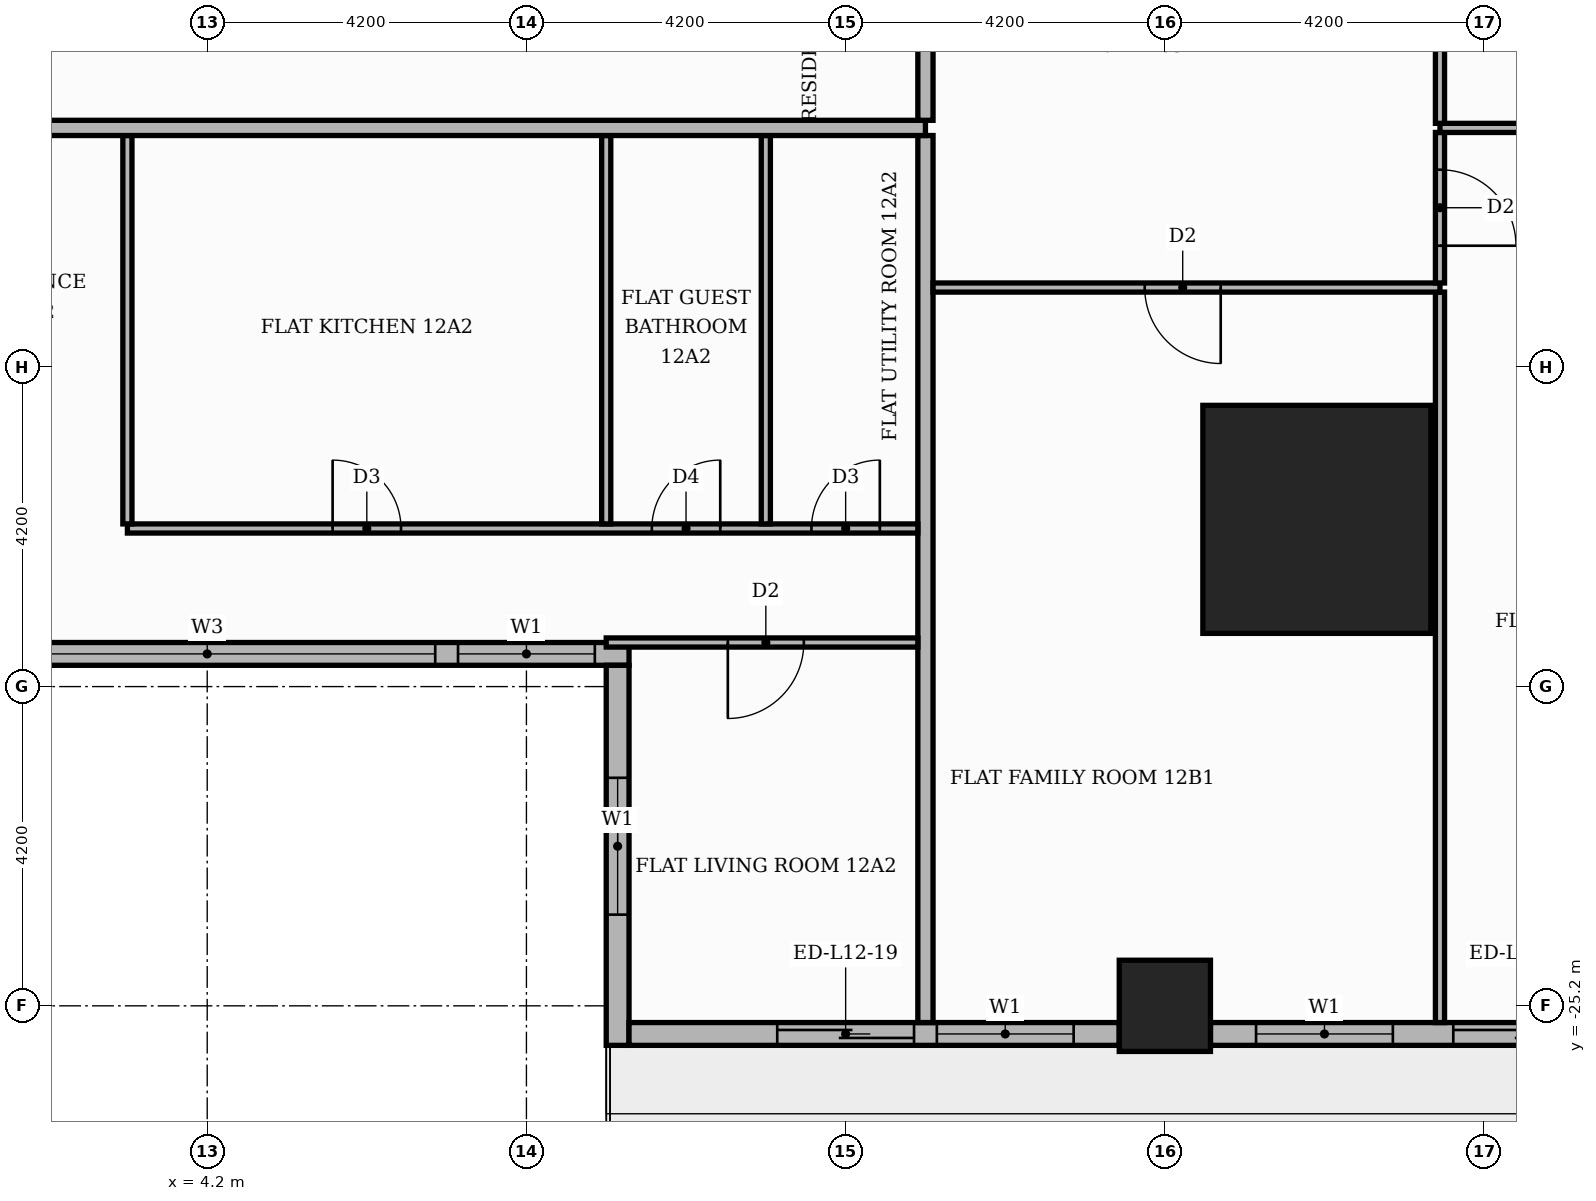
"""IFC4 building model, lengths in metres.
Left out: names, types, materials, properties, quantities, classifications, styles, units other than length and angle.
Written with IfcOpenShell. Run it as: python <this file> out.ifc"""

import sys

from ifc_helpers import new_model, si_unit, direction, frame, frame_2d, origin, origin_2d, place, context, subcontext, project, spatial, rectangle, extrude, element, fill, save


model = new_model("IFC4")
c1 = context("Model", 3, precision=1e-05, world=origin(), true_north=direction((0.0, 1.0)))
c2 = subcontext(c1, "Body", "Model", "MODEL_VIEW")
j1 = project(units=[si_unit("LENGTHUNIT", "METRE"), si_unit("PLANEANGLEUNIT", "RADIAN")], contexts=[c1])
p1 = place(None, origin())
s1 = spatial("IfcSite", under=j1, at=p1, CompositionType="ELEMENT")
p2 = place(p1, origin())
s2 = spatial("IfcBuilding", under=s1, at=p2, CompositionType="ELEMENT")
p3 = place(p2, frame((0.0, 0.0, 54.3)))
s3 = spatial("IfcBuildingStorey", under=s2, at=p3, CompositionType="ELEMENT", Elevation=54.3)
p4 = place(p3, frame((18.8, -18.8, 0.0), z_axis=(0.0, 0.0, 1.0), x_axis=(1.0, 0.0, 0.0)))
e1 = element("IfcColumn", 1, at=p4, inside=s3, PredefinedType="COLUMN", context=c2, shape_type="SweptSolid", body=[
    extrude(rectangle(XDim=3.0, YDim=3.0, at=origin_2d()), origin(), (0.0, 0.0, 1.0), 3.9),
])
p5 = place(p3, frame((16.8, -25.2, 0.0), z_axis=(0.0, 0.0, 1.0), x_axis=(1.0, 0.0, 0.0)))
e2 = element("IfcColumn", 2, at=p5, inside=s3, PredefinedType="COLUMN", context=c2, shape_type="SweptSolid", body=[
    extrude(rectangle(XDim=1.2, YDim=1.2, at=origin_2d()), origin(), (0.0, 0.0, 1.0), 3.9),
])
p6 = place(p3, frame((-9.45, -20.57, 0.0), z_axis=(0.0, 0.0, 1.0), x_axis=(1.0, 0.0, 0.0)))
e3 = element("IfcWall", 3, at=p6, inside=s3, PredefinedType="STANDARD", context=c2, shape_type="SweptSolid", body=[
    extrude(rectangle(XDim=19.2, YDim=0.3, at=frame_2d((9.6, 0.0))), origin(), (0.0, 0.0, 1.0), 3.48),
])
p7 = place(p6, frame((0.15, 0.0, 0.9)))
e4 = element("IfcOpeningElement", 4, at=p7, cuts=e3, PredefinedType="OPENING", context=c2, shape_type="SweptSolid", body=[
    extrude(rectangle(XDim=3.9, YDim=2.1, at=frame_2d((1.95, 1.05))), frame((0.0, 0.16, 0.0), z_axis=(0.0, -1.0, 0.0), x_axis=(1.0, 0.0, 0.0)), (0.0, 0.0, 1.0), 0.32),
])
p8 = place(p6, frame((4.35, 0.0, 0.9)))
e5 = element("IfcOpeningElement", 5, at=p8, cuts=e3, PredefinedType="OPENING", context=c2, shape_type="SweptSolid", body=[
    extrude(rectangle(XDim=6.0, YDim=2.1, at=frame_2d((3.0, 1.05))), frame((0.0, 0.16, 0.0), z_axis=(0.0, -1.0, 0.0), x_axis=(1.0, 0.0, 0.0)), (0.0, 0.0, 1.0), 0.32),
])
p9 = place(p6, frame((10.65, 0.0, 0.9)))
e6 = element("IfcOpeningElement", 6, at=p9, cuts=e3, PredefinedType="OPENING", context=c2, shape_type="SweptSolid", body=[
    extrude(rectangle(XDim=6.0, YDim=2.1, at=frame_2d((3.0, 1.05))), frame((0.0, 0.16, 0.0), z_axis=(0.0, -1.0, 0.0), x_axis=(1.0, 0.0, 0.0)), (0.0, 0.0, 1.0), 0.32),
])
p10 = place(p6, frame((16.95, 0.0, 0.9)))
e7 = element("IfcOpeningElement", 7, at=p10, cuts=e3, PredefinedType="OPENING", context=c2, shape_type="SweptSolid", body=[
    extrude(rectangle(XDim=1.8, YDim=2.1, at=frame_2d((0.9, 1.05))), frame((0.0, 0.16, 0.0), z_axis=(0.0, -1.0, 0.0), x_axis=(1.0, 0.0, 0.0)), (0.0, 0.0, 1.0), 0.32),
])
p11 = place(p3, frame((9.6, -20.72, 0.0), z_axis=(0.0, 0.0, 1.0), x_axis=(0.0, -1.0, 0.0)))
e8 = element("IfcWall", 8, at=p11, inside=s3, PredefinedType="STANDARD", context=c2, shape_type="SweptSolid", body=[
    extrude(rectangle(XDim=5.0, YDim=0.3, at=frame_2d((2.5, 0.0))), origin(), (0.0, 0.0, 1.0), 3.48),
])
p12 = place(p11, frame((1.48, 0.0, 0.9)))
e9 = element("IfcOpeningElement", 9, at=p12, cuts=e8, PredefinedType="OPENING", context=c2, shape_type="SweptSolid", body=[
    extrude(rectangle(XDim=1.8, YDim=2.1, at=frame_2d((0.9, 1.05))), frame((0.0, 0.16, 0.0), z_axis=(0.0, -1.0, 0.0), x_axis=(1.0, 0.0, 0.0)), (0.0, 0.0, 1.0), 0.32),
])
p13 = place(p3, frame((9.75, -25.57, 0.0), z_axis=(0.0, 0.0, 1.0), x_axis=(1.0, 0.0, 0.0)))
e10 = element("IfcWall", 10, at=p13, inside=s3, PredefinedType="STANDARD", context=c2, shape_type="SweptSolid", body=[
    extrude(rectangle(XDim=6.45, YDim=0.3, at=frame_2d((3.225, 0.0))), origin(), (0.0, 0.0, 1.0), 3.48),
])
p14 = place(p13, frame((1.95, 0.0, 0.0)))
e11 = element("IfcOpeningElement", 11, at=p14, cuts=e10, PredefinedType="OPENING", context=c2, shape_type="SweptSolid", body=[
    extrude(rectangle(XDim=1.8, YDim=2.4, at=frame_2d((0.9, 1.2))), frame((0.0, 0.16, 0.0), z_axis=(0.0, -1.0, 0.0), x_axis=(1.0, 0.0, 0.0)), (0.0, 0.0, 1.0), 0.32),
])
p15 = place(p13, frame((4.05, 0.0, 0.9)))
e12 = element("IfcOpeningElement", 12, at=p15, cuts=e10, PredefinedType="OPENING", context=c2, shape_type="SweptSolid", body=[
    extrude(rectangle(XDim=1.8, YDim=2.1, at=frame_2d((0.9, 1.05))), frame((0.0, 0.16, 0.0), z_axis=(0.0, -1.0, 0.0), x_axis=(1.0, 0.0, 0.0)), (0.0, 0.0, 1.0), 0.32),
])
p16 = place(p3, frame((17.4, -25.57, 0.0), z_axis=(0.0, 0.0, 1.0), x_axis=(1.0, 0.0, 0.0)))
e13 = element("IfcWall", 13, at=p16, inside=s3, PredefinedType="STANDARD", context=c2, shape_type="SweptSolid", body=[
    extrude(rectangle(XDim=5.32, YDim=0.3, at=frame_2d((2.66, 0.0))), origin(), (0.0, 0.0, 1.0), 3.48),
])
p17 = place(p16, frame((0.6, 0.0, 0.9)))
e14 = element("IfcOpeningElement", 14, at=p17, cuts=e13, PredefinedType="OPENING", context=c2, shape_type="SweptSolid", body=[
    extrude(rectangle(XDim=1.8, YDim=2.1, at=frame_2d((0.9, 1.05))), frame((0.0, 0.16, 0.0), z_axis=(0.0, -1.0, 0.0), x_axis=(1.0, 0.0, 0.0)), (0.0, 0.0, 1.0), 0.32),
])
p18 = place(p16, frame((3.195, 0.0, 0.0)))
e15 = element("IfcOpeningElement", 15, at=p18, cuts=e13, PredefinedType="OPENING", context=c2, shape_type="SweptSolid", body=[
    extrude(rectangle(XDim=1.8, YDim=2.4, at=frame_2d((0.9, 1.2))), frame((0.0, 0.16, 0.0), z_axis=(0.0, -1.0, 0.0), x_axis=(1.0, 0.0, 0.0)), (0.0, 0.0, 1.0), 0.32),
])
p19 = place(p3, frame((13.65, -25.42, 0.0), z_axis=(0.0, 0.0, 1.0), x_axis=(0.0, 1.0, 0.0)))
e16 = element("IfcWall", 16, at=p19, inside=s3, PredefinedType="PARTITIONING", context=c2, shape_type="SweptSolid", body=[
    extrude(rectangle(XDim=11.67, YDim=0.2, at=frame_2d((5.835, 0.0))), origin(), (0.0, 0.0, 1.0), 3.48),
])
p20 = place(p3, frame((20.42, -25.42, 0.0), z_axis=(0.0, 0.0, 1.0), x_axis=(0.0, 1.0, 0.0)))
e17 = element("IfcWall", 17, at=p20, inside=s3, PredefinedType="PARTITIONING", context=c2, shape_type="SweptSolid", body=[
    extrude(rectangle(XDim=9.61, YDim=0.12, at=frame_2d((4.805, 0.0))), origin(), (0.0, 0.0, 1.0), 3.48),
])
p21 = place(p3, frame((9.45, -20.42, 0.0), z_axis=(0.0, 0.0, 1.0), x_axis=(1.0, 0.0, 0.0)))
e18 = element("IfcWall", 18, at=p21, inside=s3, PredefinedType="PARTITIONING", context=c2, shape_type="SweptSolid", body=[
    extrude(rectangle(XDim=4.1, YDim=0.12, at=frame_2d((2.05, 0.0))), origin(), (0.0, 0.0, 1.0), 3.48),
])
p22 = place(p21, frame((1.6, 0.0, 0.0)))
e19 = element("IfcOpeningElement", 19, at=p22, cuts=e18, PredefinedType="OPENING", context=c2, shape_type="SweptSolid", body=[
    extrude(rectangle(XDim=1.0, YDim=2.1, at=frame_2d((0.5, 1.05))), frame((0.0, 0.07, 0.0), z_axis=(0.0, -1.0, 0.0), x_axis=(1.0, 0.0, 0.0)), (0.0, 0.0, 1.0), 0.14),
])
p23 = place(p3, frame((3.15, -18.92, 0.0), z_axis=(0.0, 0.0, 1.0), x_axis=(1.0, 0.0, 0.0)))
e20 = element("IfcWall", 20, at=p23, inside=s3, PredefinedType="PARTITIONING", context=c2, shape_type="SweptSolid", body=[
    extrude(rectangle(XDim=10.4, YDim=0.12, at=frame_2d((5.2, 0.0))), origin(), (0.0, 0.0, 1.0), 3.48),
])
p24 = place(p23, frame((2.7, 0.0, 0.0)))
e21 = element("IfcOpeningElement", 21, at=p24, cuts=e20, PredefinedType="OPENING", context=c2, shape_type="SweptSolid", body=[
    extrude(rectangle(XDim=0.9, YDim=2.1, at=frame_2d((0.45, 1.05))), frame((0.0, 0.07, 0.0), z_axis=(0.0, -1.0, 0.0), x_axis=(1.0, 0.0, 0.0)), (0.0, 0.0, 1.0), 0.14),
])
p25 = place(p23, frame((6.9, 0.0, 0.0)))
e22 = element("IfcOpeningElement", 22, at=p25, cuts=e20, PredefinedType="OPENING", context=c2, shape_type="SweptSolid", body=[
    extrude(rectangle(XDim=0.9, YDim=2.1, at=frame_2d((0.45, 1.05))), frame((0.0, 0.07, 0.0), z_axis=(0.0, -1.0, 0.0), x_axis=(1.0, 0.0, 0.0)), (0.0, 0.0, 1.0), 0.14),
])
p26 = place(p23, frame((9.0, 0.0, 0.0)))
e23 = element("IfcOpeningElement", 23, at=p26, cuts=e20, PredefinedType="OPENING", context=c2, shape_type="SweptSolid", body=[
    extrude(rectangle(XDim=0.9, YDim=2.1, at=frame_2d((0.45, 1.05))), frame((0.0, 0.07, 0.0), z_axis=(0.0, -1.0, 0.0), x_axis=(1.0, 0.0, 0.0)), (0.0, 0.0, 1.0), 0.14),
])
for number, where, z_axis, x_axis in (
    (24, (3.15, -18.86, 0.0), (0.0, 0.0, 1.0), (0.0, 1.0, 0.0)),
    (25, (9.45, -18.86, 0.0), (0.0, 0.0, 1.0), (0.0, 1.0, 0.0)),
    (26, (11.55, -18.86, 0.0), (0.0, 0.0, 1.0), (0.0, 1.0, 0.0)),
):
    element("IfcWall", number, at=place(p3, frame(where, z_axis=z_axis, x_axis=x_axis)), inside=s3, PredefinedType="PARTITIONING", context=c2, shape_type="SweptSolid", body=[
        extrude(rectangle(XDim=5.11, YDim=0.12, at=frame_2d((2.555, 0.0))), origin(), (0.0, 0.0, 1.0), 3.48),
    ])
p27 = place(p3, frame((13.75, -15.75, 0.0), z_axis=(0.0, 0.0, 1.0), x_axis=(1.0, 0.0, 0.0)))
e27 = element("IfcWall", 27, at=p27, inside=s3, PredefinedType="PARTITIONING", context=c2, shape_type="SweptSolid", body=[
    extrude(rectangle(XDim=6.67, YDim=0.12, at=frame_2d((3.335, 0.0))), origin(), (0.0, 0.0, 1.0), 3.48),
])
p28 = place(p27, frame((2.785, 0.0, 0.0)))
e28 = element("IfcOpeningElement", 28, at=p28, cuts=e27, PredefinedType="OPENING", context=c2, shape_type="SweptSolid", body=[
    extrude(rectangle(XDim=1.0, YDim=2.1, at=frame_2d((0.5, 1.05))), frame((0.0, 0.07, 0.0), z_axis=(0.0, -1.0, 0.0), x_axis=(1.0, 0.0, 0.0)), (0.0, 0.0, 1.0), 0.14),
])
p29 = place(p3, frame((20.42, -15.69, 0.0), z_axis=(0.0, 0.0, 1.0), x_axis=(0.0, 1.0, 0.0)))
e29 = element("IfcWall", 29, at=p29, inside=s3, PredefinedType="PARTITIONING", context=c2, shape_type="SweptSolid", body=[
    extrude(rectangle(XDim=1.98, YDim=0.12, at=frame_2d((0.99, 0.0))), origin(), (0.0, 0.0, 1.0), 3.48),
])
p30 = place(p29, frame((0.49, 0.0, 0.0)))
e30 = element("IfcOpeningElement", 30, at=p30, cuts=e29, PredefinedType="OPENING", context=c2, shape_type="SweptSolid", body=[
    extrude(rectangle(XDim=1.0, YDim=2.1, at=frame_2d((0.5, 1.05))), frame((0.0, 0.07, 0.0), z_axis=(0.0, -1.0, 0.0), x_axis=(1.0, 0.0, 0.0)), (0.0, 0.0, 1.0), 0.14),
])
p31 = place(p3, frame((-25.42, -13.65, 0.0), z_axis=(0.0, 0.0, 1.0), x_axis=(1.0, 0.0, 0.0)))
e31 = element("IfcWall", 31, at=p31, inside=s3, PredefinedType="PARTITIONING", context=c2, shape_type="SweptSolid", body=[
    extrude(rectangle(XDim=39.07, YDim=0.2, at=frame_2d((19.535, 0.0))), origin(), (0.0, 0.0, 1.0), 3.48),
])
p32 = place(p31, frame((13.32, 0.0, 0.0)))
e32 = element("IfcOpeningElement", 32, at=p32, cuts=e31, PredefinedType="OPENING", context=c2, shape_type="SweptSolid", body=[
    extrude(rectangle(XDim=1.1, YDim=2.4, at=frame_2d((0.55, 1.2))), frame((0.0, 0.11, 0.0), z_axis=(0.0, -1.0, 0.0), x_axis=(1.0, 0.0, 0.0)), (0.0, 0.0, 1.0), 0.22),
])
p33 = place(p31, frame((25.92, 0.0, 0.0)))
e33 = element("IfcOpeningElement", 33, at=p33, cuts=e31, PredefinedType="OPENING", context=c2, shape_type="SweptSolid", body=[
    extrude(rectangle(XDim=1.1, YDim=2.4, at=frame_2d((0.55, 1.2))), frame((0.0, 0.11, 0.0), z_axis=(0.0, -1.0, 0.0), x_axis=(1.0, 0.0, 0.0)), (0.0, 0.0, 1.0), 0.22),
])
p34 = place(p3, frame((20.42, -13.65, 0.0), z_axis=(0.0, 0.0, 1.0), x_axis=(1.0, 0.0, 0.0)))
e34 = element("IfcWall", 34, at=p34, inside=s3, PredefinedType="PARTITIONING", context=c2, shape_type="SweptSolid", body=[
    extrude(rectangle(XDim=5.0, YDim=0.12, at=frame_2d((2.5, 0.0))), origin(), (0.0, 0.0, 1.0), 3.48),
])
p35 = place(p3, frame((20.42, -13.59, 0.0), z_axis=(0.0, 0.0, 1.0), x_axis=(0.0, 1.0, 0.0)))
e35 = element("IfcWall", 35, at=p35, inside=s3, PredefinedType="PARTITIONING", context=c2, shape_type="SweptSolid", body=[
    extrude(rectangle(XDim=4.08, YDim=0.12, at=frame_2d((2.04, 0.0))), origin(), (0.0, 0.0, 1.0), 3.48),
])
p36 = place(p35, frame((1.59, 0.0, 0.0)))
e36 = element("IfcOpeningElement", 36, at=p36, cuts=e35, PredefinedType="OPENING", context=c2, shape_type="SweptSolid", body=[
    extrude(rectangle(XDim=0.9, YDim=2.1, at=frame_2d((0.45, 1.05))), frame((0.0, 0.07, 0.0), z_axis=(0.0, -1.0, 0.0), x_axis=(1.0, 0.0, 0.0)), (0.0, 0.0, 1.0), 0.14),
])
p37 = place(p3, frame((13.65, -13.55, 0.0), z_axis=(0.0, 0.0, 1.0), x_axis=(0.0, 1.0, 0.0)))
e37 = element("IfcWall", 37, at=p37, inside=s3, PredefinedType="PARTITIONING", context=c2, shape_type="SweptSolid", body=[
    extrude(rectangle(XDim=27.1, YDim=0.2, at=frame_2d((13.55, 0.0))), origin(), (0.0, 0.0, 1.0), 3.48),
])
p38 = place(p37, frame((1.45, 0.0, 0.0)))
e38 = element("IfcOpeningElement", 38, at=p38, cuts=e37, PredefinedType="OPENING", context=c2, shape_type="SweptSolid", body=[
    extrude(rectangle(XDim=1.1, YDim=2.4, at=frame_2d((0.55, 1.2))), frame((0.0, 0.11, 0.0), z_axis=(0.0, -1.0, 0.0), x_axis=(1.0, 0.0, 0.0)), (0.0, 0.0, 1.0), 0.22),
])
p39 = place(p9, origin())
e39 = element("IfcWindow", 39, at=p39, inside=s3, PartitioningType="SINGLE_PANEL", PredefinedType="WINDOW", context=c2, shape_type="SweptSolid", body=[
    extrude(rectangle(XDim=6.0, YDim=2.1, at=frame_2d((3.0, 1.05))), frame((0.0, 0.03, 0.0), z_axis=(0.0, -1.0, 0.0), x_axis=(1.0, 0.0, 0.0)), (0.0, 0.0, 1.0), 0.06),
])
fill(e6, e39)
p40 = place(p10, origin())
e40 = element("IfcWindow", 40, at=p40, inside=s3, PartitioningType="SINGLE_PANEL", PredefinedType="WINDOW", context=c2, shape_type="SweptSolid", body=[
    extrude(rectangle(XDim=1.8, YDim=2.1, at=frame_2d((0.9, 1.05))), frame((0.0, 0.03, 0.0), z_axis=(0.0, -1.0, 0.0), x_axis=(1.0, 0.0, 0.0)), (0.0, 0.0, 1.0), 0.06),
])
fill(e7, e40)
p41 = place(p12, origin())
e41 = element("IfcWindow", 41, at=p41, inside=s3, PartitioningType="SINGLE_PANEL", PredefinedType="WINDOW", context=c2, shape_type="SweptSolid", body=[
    extrude(rectangle(XDim=1.8, YDim=2.1, at=frame_2d((0.9, 1.05))), frame((0.0, 0.03, 0.0), z_axis=(0.0, -1.0, 0.0), x_axis=(1.0, 0.0, 0.0)), (0.0, 0.0, 1.0), 0.06),
])
fill(e9, e41)
p42 = place(p14, origin())
e42 = element("IfcDoor", 42, at=p42, inside=s3, OperationType="SLIDING_TO_RIGHT", PredefinedType="DOOR", context=c2, shape_type="SweptSolid", body=[
    extrude(rectangle(XDim=1.8, YDim=2.4, at=frame_2d((0.9, 1.2))), frame((0.0, 0.025, 0.0), z_axis=(0.0, -1.0, 0.0), x_axis=(1.0, 0.0, 0.0)), (0.0, 0.0, 1.0), 0.05),
])
fill(e11, e42)
p43 = place(p15, origin())
e43 = element("IfcWindow", 43, at=p43, inside=s3, PartitioningType="SINGLE_PANEL", PredefinedType="WINDOW", context=c2, shape_type="SweptSolid", body=[
    extrude(rectangle(XDim=1.8, YDim=2.1, at=frame_2d((0.9, 1.05))), frame((0.0, 0.03, 0.0), z_axis=(0.0, -1.0, 0.0), x_axis=(1.0, 0.0, 0.0)), (0.0, 0.0, 1.0), 0.06),
])
fill(e12, e43)
p44 = place(p17, origin())
e44 = element("IfcWindow", 44, at=p44, inside=s3, PartitioningType="SINGLE_PANEL", PredefinedType="WINDOW", context=c2, shape_type="SweptSolid", body=[
    extrude(rectangle(XDim=1.8, YDim=2.1, at=frame_2d((0.9, 1.05))), frame((0.0, 0.03, 0.0), z_axis=(0.0, -1.0, 0.0), x_axis=(1.0, 0.0, 0.0)), (0.0, 0.0, 1.0), 0.06),
])
fill(e14, e44)
p45 = place(p18, origin())
e45 = element("IfcDoor", 45, at=p45, inside=s3, OperationType="SLIDING_TO_RIGHT", PredefinedType="DOOR", context=c2, shape_type="SweptSolid", body=[
    extrude(rectangle(XDim=1.8, YDim=2.4, at=frame_2d((0.9, 1.2))), frame((0.0, 0.025, 0.0), z_axis=(0.0, -1.0, 0.0), x_axis=(1.0, 0.0, 0.0)), (0.0, 0.0, 1.0), 0.05),
])
fill(e15, e45)
p46 = place(p24, origin())
e46 = element("IfcDoor", 46, at=p46, inside=s3, OperationType="SINGLE_SWING_LEFT", PredefinedType="DOOR", context=c2, shape_type="SweptSolid", body=[
    extrude(rectangle(XDim=0.9, YDim=2.1, at=frame_2d((0.45, 1.05))), frame((0.0, 0.025, 0.0), z_axis=(0.0, -1.0, 0.0), x_axis=(1.0, 0.0, 0.0)), (0.0, 0.0, 1.0), 0.05),
])
fill(e21, e46)
p47 = place(p25, origin())
e47 = element("IfcDoor", 47, at=p47, inside=s3, OperationType="SINGLE_SWING_RIGHT", PredefinedType="DOOR", context=c2, shape_type="SweptSolid", body=[
    extrude(rectangle(XDim=0.9, YDim=2.1, at=frame_2d((0.45, 1.05))), frame((0.0, 0.025, 0.0), z_axis=(0.0, -1.0, 0.0), x_axis=(1.0, 0.0, 0.0)), (0.0, 0.0, 1.0), 0.05),
])
fill(e22, e47)
p48 = place(p26, origin())
e48 = element("IfcDoor", 48, at=p48, inside=s3, OperationType="SINGLE_SWING_RIGHT", PredefinedType="DOOR", context=c2, shape_type="SweptSolid", body=[
    extrude(rectangle(XDim=0.9, YDim=2.1, at=frame_2d((0.45, 1.05))), frame((0.0, 0.025, 0.0), z_axis=(0.0, -1.0, 0.0), x_axis=(1.0, 0.0, 0.0)), (0.0, 0.0, 1.0), 0.05),
])
fill(e23, e48)
p49 = place(p22, frame((1.0, 0.0, 0.0), z_axis=(0.0, 0.0, 1.0), x_axis=(-1.0, 0.0, 0.0)))
e49 = element("IfcDoor", 49, at=p49, inside=s3, OperationType="SINGLE_SWING_LEFT", PredefinedType="DOOR", context=c2, shape_type="SweptSolid", body=[
    extrude(rectangle(XDim=1.0, YDim=2.1, at=frame_2d((0.5, 1.05))), frame((0.0, 0.025, 0.0), z_axis=(0.0, -1.0, 0.0), x_axis=(1.0, 0.0, 0.0)), (0.0, 0.0, 1.0), 0.05),
])
fill(e19, e49)
p50 = place(p28, frame((1.0, 0.0, 0.0), z_axis=(0.0, 0.0, 1.0), x_axis=(-1.0, 0.0, 0.0)))
e50 = element("IfcDoor", 50, at=p50, inside=s3, OperationType="SINGLE_SWING_RIGHT", PredefinedType="DOOR", context=c2, shape_type="SweptSolid", body=[
    extrude(rectangle(XDim=1.0, YDim=2.1, at=frame_2d((0.5, 1.05))), frame((0.0, 0.025, 0.0), z_axis=(0.0, -1.0, 0.0), x_axis=(1.0, 0.0, 0.0)), (0.0, 0.0, 1.0), 0.05),
])
fill(e28, e50)
p51 = place(p30, frame((1.0, 0.0, 0.0), z_axis=(0.0, 0.0, 1.0), x_axis=(-1.0, 0.0, 0.0)))
e51 = element("IfcDoor", 51, at=p51, inside=s3, OperationType="SINGLE_SWING_LEFT", PredefinedType="DOOR", context=c2, shape_type="SweptSolid", body=[
    extrude(rectangle(XDim=1.0, YDim=2.1, at=frame_2d((0.5, 1.05))), frame((0.0, 0.025, 0.0), z_axis=(0.0, -1.0, 0.0), x_axis=(1.0, 0.0, 0.0)), (0.0, 0.0, 1.0), 0.05),
])
fill(e30, e51)
save(model, sys.argv[1])
